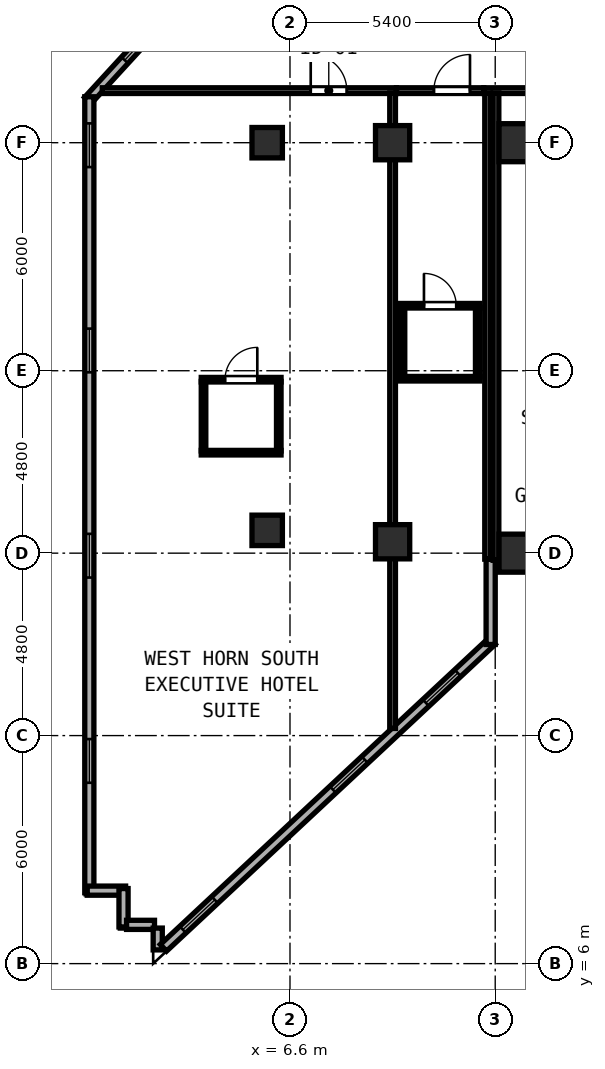
"""IFC4 building model, lengths in metres.
Left out: names, types, materials, properties, quantities, classifications, styles, units other than length and angle.
Written with IfcOpenShell. Run it as: python <this file> out.ifc"""

import sys

from ifc_helpers import new_model, si_unit, direction, frame, frame_2d, origin, origin_2d, place, context, subcontext, project, spatial, rectangle, hollow_rectangle, extrude, element, fill, save


model = new_model("IFC4")
c1 = context("Model", 3, precision=1e-05, world=origin(), true_north=direction((0.0, 1.0)))
c2 = subcontext(c1, "Body", "Model", "MODEL_VIEW")
j1 = project(units=[si_unit("LENGTHUNIT", "METRE"), si_unit("PLANEANGLEUNIT", "RADIAN")], contexts=[c1])
p1 = place(None, origin())
s1 = spatial("IfcSite", under=j1, at=p1, CompositionType="ELEMENT")
p2 = place(p1, origin())
s2 = spatial("IfcBuilding", under=s1, at=p2, CompositionType="ELEMENT")
p3 = place(p2, frame((0.0, 0.0, 152.4)))
s3 = spatial("IfcBuildingStorey", under=s2, at=p3, CompositionType="ELEMENT", Elevation=152.4)
for number, where, z_axis, x_axis in (
    (1, (12.6, 16.8, 0.0), (0.0, 0.0, 1.0), (1.0, 0.0, 0.0)),
    (2, (12.6, 27.6, 0.0), (0.0, 0.0, 1.0), (1.0, 0.0, 0.0)),
):
    element("IfcColumn", number, at=place(p3, frame(where, z_axis=z_axis, x_axis=x_axis)), inside=s3, PredefinedType="COLUMN", context=c2, shape_type="SweptSolid", body=[
        extrude(hollow_rectangle(XDim=1.0, YDim=1.0, WallThickness=0.038, at=origin_2d()), origin(), (0.0, 0.0, 1.0), 3.8),
    ])
for number, where, z_axis, x_axis in (
    (3, (6.0, 17.4, 0.0), (0.0, 0.0, 1.0), (1.0, 0.0, 0.0)),
    (4, (6.0, 27.6, 0.0), (0.0, 0.0, 1.0), (1.0, 0.0, 0.0)),
):
    element("IfcColumn", number, at=place(p3, frame(where, z_axis=z_axis, x_axis=x_axis)), inside=s3, PredefinedType="COLUMN", context=c2, shape_type="SweptSolid", body=[
        extrude(hollow_rectangle(XDim=0.8, YDim=0.8, WallThickness=0.03, at=origin_2d()), origin(), (0.0, 0.0, 1.0), 3.8),
    ])
for number, where, z_axis, x_axis in (
    (5, (9.3, 17.1, 0.0), (0.0, 0.0, 1.0), (1.0, 0.0, 0.0)),
    (6, (9.3, 27.6, 0.0), (0.0, 0.0, 1.0), (1.0, 0.0, 0.0)),
):
    element("IfcColumn", number, at=place(p3, frame(where, z_axis=z_axis, x_axis=x_axis)), inside=s3, PredefinedType="COLUMN", context=c2, shape_type="SweptSolid", body=[
        extrude(hollow_rectangle(XDim=0.9, YDim=0.9, WallThickness=0.034, at=origin_2d()), origin(), (0.0, 0.0, 1.0), 3.8),
    ])
p4 = place(p3, frame((3.502, 31.134, 0.0), z_axis=(0.0, 0.0, 1.0), x_axis=(-0.675781844312, -0.737101688302, 0.0)))
e7 = element("IfcWall", 7, at=p4, inside=s3, PredefinedType="SOLIDWALL", context=c2, shape_type="SweptSolid", body=[
    extrude(rectangle(XDim=3.285, YDim=0.24, at=frame_2d((1.642, 0.0))), origin(), (0.0, 0.0, 1.0), 3.6),
])
p5 = place(p4, frame((0.7, 0.0, 0.85)))
e8 = element("IfcOpeningElement", 8, at=p5, cuts=e7, PredefinedType="OPENING", context=c2, shape_type="SweptSolid", body=[
    extrude(rectangle(XDim=1.15, YDim=1.8, at=frame_2d((0.575, 0.9))), frame((0.0, 0.13, 0.0), z_axis=(0.0, -1.0, 0.0), x_axis=(1.0, 0.0, 0.0)), (0.0, 0.0, 1.0), 0.26),
])
p6 = place(p3, frame((1.32, 28.808, 0.0), z_axis=(0.0, 0.0, 1.0), x_axis=(0.0, -1.0, 0.0)))
e9 = element("IfcWall", 9, at=p6, inside=s3, PredefinedType="SOLIDWALL", context=c2, shape_type="SweptSolid", body=[
    extrude(rectangle(XDim=20.943, YDim=0.24, at=frame_2d((10.472, 0.0))), origin(), (0.0, 0.0, 1.0), 3.6),
])
p7 = place(p6, frame((0.7, 0.0, 0.85)))
e10 = element("IfcOpeningElement", 10, at=p7, cuts=e9, PredefinedType="OPENING", context=c2, shape_type="SweptSolid", body=[
    extrude(rectangle(XDim=1.15, YDim=1.8, at=frame_2d((0.575, 0.9))), frame((0.0, 0.13, 0.0), z_axis=(0.0, -1.0, 0.0), x_axis=(1.0, 0.0, 0.0)), (0.0, 0.0, 1.0), 0.26),
])
p8 = place(p6, frame((6.1, 0.0, 0.85)))
e11 = element("IfcOpeningElement", 11, at=p8, cuts=e9, PredefinedType="OPENING", context=c2, shape_type="SweptSolid", body=[
    extrude(rectangle(XDim=1.15, YDim=1.8, at=frame_2d((0.575, 0.9))), frame((0.0, 0.13, 0.0), z_axis=(0.0, -1.0, 0.0), x_axis=(1.0, 0.0, 0.0)), (0.0, 0.0, 1.0), 0.26),
])
p9 = place(p6, frame((11.5, 0.0, 0.85)))
e12 = element("IfcOpeningElement", 12, at=p9, cuts=e9, PredefinedType="OPENING", context=c2, shape_type="SweptSolid", body=[
    extrude(rectangle(XDim=1.15, YDim=1.8, at=frame_2d((0.575, 0.9))), frame((0.0, 0.13, 0.0), z_axis=(0.0, -1.0, 0.0), x_axis=(1.0, 0.0, 0.0)), (0.0, 0.0, 1.0), 0.26),
])
p10 = place(p6, frame((16.9, 0.0, 0.85)))
e13 = element("IfcOpeningElement", 13, at=p10, cuts=e9, PredefinedType="OPENING", context=c2, shape_type="SweptSolid", body=[
    extrude(rectangle(XDim=1.15, YDim=1.8, at=frame_2d((0.575, 0.9))), frame((0.0, 0.13, 0.0), z_axis=(0.0, -1.0, 0.0), x_axis=(1.0, 0.0, 0.0)), (0.0, 0.0, 1.0), 0.26),
])
for number, where, z_axis, x_axis in (
    (14, (1.265, 7.92, 0.0), (0.0, 0.0, 1.0), (1.0, 0.0, 0.0)),
    (15, (2.22, 7.975, 0.0), (0.0, 0.0, 1.0), (0.0, -1.0, 0.0)),
):
    element("IfcWall", number, at=place(p3, frame(where, z_axis=z_axis, x_axis=x_axis)), inside=s3, PredefinedType="SOLIDWALL", context=c2, shape_type="SweptSolid", body=[
        extrude(rectangle(XDim=1.01, YDim=0.24, at=frame_2d((0.505, 0.0))), origin(), (0.0, 0.0, 1.0), 3.6),
    ])
p11 = place(p3, frame((2.3, 7.02, 0.0), z_axis=(0.0, 0.0, 1.0), x_axis=(1.0, 0.0, 0.0)))
e16 = element("IfcWall", 16, at=p11, inside=s3, PredefinedType="SOLIDWALL", context=c2, shape_type="SweptSolid", body=[
    extrude(rectangle(XDim=0.735, YDim=0.24, at=frame_2d((0.367, 0.0))), origin(), (0.0, 0.0, 1.0), 3.6),
])
p12 = place(p3, frame((3.12, 6.935, 0.0), z_axis=(0.0, 0.0, 1.0), x_axis=(0.0, -1.0, 0.0)))
e17 = element("IfcWall", 17, at=p12, inside=s3, PredefinedType="SOLIDWALL", context=c2, shape_type="SweptSolid", body=[
    extrude(rectangle(XDim=0.574, YDim=0.24, at=frame_2d((0.287, 0.0))), origin(), (0.0, 0.0, 1.0), 3.6),
])
p13 = place(p3, frame((3.27, 6.416, 0.0), z_axis=(0.0, 0.0, 1.0), x_axis=(0.731064187858, 0.682308693505, 0.0)))
e18 = element("IfcWall", 18, at=p13, inside=s3, PredefinedType="SOLIDWALL", context=c2, shape_type="SweptSolid", body=[
    extrude(rectangle(XDim=11.833, YDim=0.24, at=frame_2d((5.916, 0.0))), origin(), (0.0, 0.0, 1.0), 3.6),
])
p14 = place(p13, frame((0.7, 0.0, 0.85)))
e19 = element("IfcOpeningElement", 19, at=p14, cuts=e18, PredefinedType="OPENING", context=c2, shape_type="SweptSolid", body=[
    extrude(rectangle(XDim=1.15, YDim=1.8, at=frame_2d((0.575, 0.9))), frame((0.0, 0.13, 0.0), z_axis=(0.0, -1.0, 0.0), x_axis=(1.0, 0.0, 0.0)), (0.0, 0.0, 1.0), 0.26),
])
p15 = place(p13, frame((6.1, 0.0, 0.85)))
e20 = element("IfcOpeningElement", 20, at=p15, cuts=e18, PredefinedType="OPENING", context=c2, shape_type="SweptSolid", body=[
    extrude(rectangle(XDim=1.15, YDim=1.8, at=frame_2d((0.575, 0.9))), frame((0.0, 0.13, 0.0), z_axis=(0.0, -1.0, 0.0), x_axis=(1.0, 0.0, 0.0)), (0.0, 0.0, 1.0), 0.26),
])
p16 = place(p13, frame((9.446, 0.0, 0.85)))
e21 = element("IfcOpeningElement", 21, at=p16, cuts=e18, PredefinedType="OPENING", context=c2, shape_type="SweptSolid", body=[
    extrude(rectangle(XDim=1.15, YDim=1.8, at=frame_2d((0.575, 0.9))), frame((0.0, 0.13, 0.0), z_axis=(0.0, -1.0, 0.0), x_axis=(1.0, 0.0, 0.0)), (0.0, 0.0, 1.0), 0.26),
])
p17 = place(p3, frame((11.88, 14.397, 0.0), z_axis=(0.0, 0.0, 1.0), x_axis=(0.0, 1.0, 0.0)))
e22 = element("IfcWall", 22, at=p17, inside=s3, PredefinedType="SOLIDWALL", context=c2, shape_type="SweptSolid", body=[
    extrude(rectangle(XDim=2.243, YDim=0.24, at=frame_2d((1.121, 0.0))), origin(), (0.0, 0.0, 1.0), 3.6),
])
p18 = place(p3, frame((11.7, 28.97, 0.0), z_axis=(0.0, 0.0, 1.0), x_axis=(1.0, 0.0, 0.0)))
e23 = element("IfcWall", 23, at=p18, inside=s3, PredefinedType="PARTITIONING", context=c2, shape_type="SweptSolid", body=[
    extrude(rectangle(XDim=4.59, YDim=0.15, at=frame_2d((2.295, 0.0))), origin(), (0.0, 0.0, 1.0), 3.6),
])
p19 = place(p18, frame((4.311, 0.0, 0.0), z_axis=(0.0, 0.0, 1.0), x_axis=(-1.0, 0.0, 0.0)))
e24 = element("IfcOpeningElement", 24, at=p19, cuts=e23, PredefinedType="OPENING", context=c2, shape_type="SweptSolid", body=[
    extrude(rectangle(XDim=0.95, YDim=2.15, at=frame_2d((0.475, 1.075))), frame((0.0, 0.085, 0.0), z_axis=(0.0, -1.0, 0.0), x_axis=(1.0, 0.0, 0.0)), (0.0, 0.0, 1.0), 0.17),
])
p20 = place(p3, frame((11.8, 16.642, 0.0), z_axis=(0.0, 0.0, 1.0), x_axis=(0.0, 1.0, 0.0)))
e25 = element("IfcWall", 25, at=p20, inside=s3, PredefinedType="PARTITIONING", context=c2, shape_type="SweptSolid", body=[
    extrude(rectangle(XDim=12.268, YDim=0.15, at=frame_2d((6.134, 0.0))), origin(), (0.0, 0.0, 1.0), 3.6),
])
p21 = place(p3, frame((1.661, 28.97, 0.0), z_axis=(0.0, 0.0, 1.0), x_axis=(1.0, 0.0, 0.0)))
e26 = element("IfcWall", 26, at=p21, inside=s3, PredefinedType="PARTITIONING", context=c2, shape_type="SweptSolid", body=[
    extrude(rectangle(XDim=7.739, YDim=0.15, at=frame_2d((3.87, 0.0))), origin(), (0.0, 0.0, 1.0), 3.6),
])
p22 = place(p21, frame((6.434, 0.0, 0.0), z_axis=(0.0, 0.0, 1.0), x_axis=(-1.0, 0.0, 0.0)))
e27 = element("IfcOpeningElement", 27, at=p22, cuts=e26, PredefinedType="OPENING", context=c2, shape_type="SweptSolid", body=[
    extrude(rectangle(XDim=0.95, YDim=2.18, at=frame_2d((0.475, 1.09))), frame((0.0, 0.085, 0.0), z_axis=(0.0, -1.0, 0.0), x_axis=(1.0, 0.0, 0.0)), (0.0, 0.0, 1.0), 0.17),
])
p23 = place(p3, frame((9.3, 12.188, 0.0), z_axis=(0.0, 0.0, 1.0), x_axis=(0.0, 1.0, 0.0)))
e28 = element("IfcWall", 28, at=p23, inside=s3, PredefinedType="PARTITIONING", context=c2, shape_type="SweptSolid", body=[
    extrude(rectangle(XDim=16.722, YDim=0.15, at=frame_2d((8.361, 0.0))), origin(), (0.0, 0.0, 1.0), 3.6),
])
p24 = place(p3, frame((4.265, 21.364, 0.0), z_axis=(0.0, 0.0, 1.0), x_axis=(1.0, 0.0, 0.0)))
e29 = element("IfcWall", 29, at=p24, inside=s3, PredefinedType="PARTITIONING", context=c2, shape_type="SweptSolid", body=[
    extrude(rectangle(XDim=2.1, YDim=0.12, at=frame_2d((1.05, 0.0))), origin(), (0.0, 0.0, 1.0), 3.6),
])
p25 = place(p24, frame((1.475, 0.0, 0.0), z_axis=(0.0, 0.0, 1.0), x_axis=(-1.0, 0.0, 0.0)))
e30 = element("IfcOpeningElement", 30, at=p25, cuts=e29, PredefinedType="OPENING", context=c2, shape_type="SweptSolid", body=[
    extrude(rectangle(XDim=0.85, YDim=2.1, at=frame_2d((0.425, 1.05))), frame((0.0, 0.07, 0.0), z_axis=(0.0, -1.0, 0.0), x_axis=(1.0, 0.0, 0.0)), (0.0, 0.0, 1.0), 0.14),
])
p26 = place(p3, frame((4.265, 19.444, 0.0), z_axis=(0.0, 0.0, 1.0), x_axis=(1.0, 0.0, 0.0)))
e31 = element("IfcWall", 31, at=p26, inside=s3, PredefinedType="PARTITIONING", context=c2, shape_type="SweptSolid", body=[
    extrude(rectangle(XDim=2.1, YDim=0.12, at=frame_2d((1.05, 0.0))), origin(), (0.0, 0.0, 1.0), 3.6),
])
for number, where, z_axis, x_axis in (
    (32, (4.325, 19.489, 0.0), (0.0, 0.0, 1.0), (0.0, 1.0, 0.0)),
    (33, (6.305, 19.489, 0.0), (0.0, 0.0, 1.0), (0.0, 1.0, 0.0)),
):
    element("IfcWall", number, at=place(p3, frame(where, z_axis=z_axis, x_axis=x_axis)), inside=s3, PredefinedType="PARTITIONING", context=c2, shape_type="SweptSolid", body=[
        extrude(rectangle(XDim=1.83, YDim=0.12, at=frame_2d((0.915, 0.0))), origin(), (0.0, 0.0, 1.0), 3.6),
    ])
p27 = place(p3, frame((9.402, 28.97, 0.0), z_axis=(0.0, 0.0, 1.0), x_axis=(1.0, 0.0, 0.0)))
e34 = element("IfcWall", 34, at=p27, inside=s3, PredefinedType="PARTITIONING", context=c2, shape_type="SweptSolid", body=[
    extrude(rectangle(XDim=2.296, YDim=0.15, at=frame_2d((1.148, 0.0))), origin(), (0.0, 0.0, 1.0), 3.6),
])
p28 = place(p27, frame((1.934, 0.0, 0.0), z_axis=(0.0, 0.0, 1.0), x_axis=(-1.0, 0.0, 0.0)))
e35 = element("IfcOpeningElement", 35, at=p28, cuts=e34, PredefinedType="OPENING", context=c2, shape_type="SweptSolid", body=[
    extrude(rectangle(XDim=0.95, YDim=2.15, at=frame_2d((0.475, 1.075))), frame((0.0, 0.085, 0.0), z_axis=(0.0, -1.0, 0.0), x_axis=(1.0, 0.0, 0.0)), (0.0, 0.0, 1.0), 0.17),
])
p29 = place(p3, frame((12.02, 16.612, 0.0), z_axis=(0.0, 0.0, 1.0), x_axis=(0.0, 1.0, 0.0)))
e36 = element("IfcWall", 36, at=p29, inside=s3, PredefinedType="PARTITIONING", context=c2, shape_type="SweptSolid", body=[
    extrude(rectangle(XDim=12.298, YDim=0.15, at=frame_2d((6.149, 0.0))), origin(), (0.0, 0.0, 1.0), 3.6),
])
p30 = place(p3, frame((9.5, 23.31, 0.0), z_axis=(0.0, 0.0, 1.0), x_axis=(1.0, 0.0, 0.0)))
e37 = element("IfcWall", 37, at=p30, inside=s3, PredefinedType="PARTITIONING", context=c2, shape_type="SweptSolid", body=[
    extrude(rectangle(XDim=2.1, YDim=0.12, at=frame_2d((1.05, 0.0))), origin(), (0.0, 0.0, 1.0), 3.6),
])
p31 = place(p30, frame((1.475, 0.0, 0.0), z_axis=(0.0, 0.0, 1.0), x_axis=(-1.0, 0.0, 0.0)))
e38 = element("IfcOpeningElement", 38, at=p31, cuts=e37, PredefinedType="OPENING", context=c2, shape_type="SweptSolid", body=[
    extrude(rectangle(XDim=0.85, YDim=2.1, at=frame_2d((0.425, 1.05))), frame((0.0, 0.07, 0.0), z_axis=(0.0, -1.0, 0.0), x_axis=(1.0, 0.0, 0.0)), (0.0, 0.0, 1.0), 0.14),
])
p32 = place(p3, frame((9.5, 21.39, 0.0), z_axis=(0.0, 0.0, 1.0), x_axis=(1.0, 0.0, 0.0)))
e39 = element("IfcWall", 39, at=p32, inside=s3, PredefinedType="PARTITIONING", context=c2, shape_type="SweptSolid", body=[
    extrude(rectangle(XDim=2.1, YDim=0.12, at=frame_2d((1.05, 0.0))), origin(), (0.0, 0.0, 1.0), 3.6),
])
for number, where, z_axis, x_axis in (
    (40, (9.56, 21.435, 0.0), (0.0, 0.0, 1.0), (0.0, 1.0, 0.0)),
    (41, (11.54, 21.435, 0.0), (0.0, 0.0, 1.0), (0.0, 1.0, 0.0)),
):
    element("IfcWall", number, at=place(p3, frame(where, z_axis=z_axis, x_axis=x_axis)), inside=s3, PredefinedType="PARTITIONING", context=c2, shape_type="SweptSolid", body=[
        extrude(rectangle(XDim=1.83, YDim=0.12, at=frame_2d((0.915, 0.0))), origin(), (0.0, 0.0, 1.0), 3.6),
    ])
p33 = place(p5, origin())
e42 = element("IfcWindow", 42, at=p33, inside=s3, PartitioningType="SINGLE_PANEL", PredefinedType="WINDOW", context=c2, shape_type="SweptSolid", body=[
    extrude(rectangle(XDim=1.15, YDim=1.8, at=frame_2d((0.575, 0.9))), frame((0.0, 0.03, 0.0), z_axis=(0.0, -1.0, 0.0), x_axis=(1.0, 0.0, 0.0)), (0.0, 0.0, 1.0), 0.06),
])
fill(e8, e42)
p34 = place(p7, origin())
e43 = element("IfcWindow", 43, at=p34, inside=s3, PartitioningType="SINGLE_PANEL", PredefinedType="WINDOW", context=c2, shape_type="SweptSolid", body=[
    extrude(rectangle(XDim=1.15, YDim=1.8, at=frame_2d((0.575, 0.9))), frame((0.0, 0.03, 0.0), z_axis=(0.0, -1.0, 0.0), x_axis=(1.0, 0.0, 0.0)), (0.0, 0.0, 1.0), 0.06),
])
fill(e10, e43)
p35 = place(p8, origin())
e44 = element("IfcWindow", 44, at=p35, inside=s3, PartitioningType="SINGLE_PANEL", PredefinedType="WINDOW", context=c2, shape_type="SweptSolid", body=[
    extrude(rectangle(XDim=1.15, YDim=1.8, at=frame_2d((0.575, 0.9))), frame((0.0, 0.03, 0.0), z_axis=(0.0, -1.0, 0.0), x_axis=(1.0, 0.0, 0.0)), (0.0, 0.0, 1.0), 0.06),
])
fill(e11, e44)
p36 = place(p9, origin())
e45 = element("IfcWindow", 45, at=p36, inside=s3, PartitioningType="SINGLE_PANEL", PredefinedType="WINDOW", context=c2, shape_type="SweptSolid", body=[
    extrude(rectangle(XDim=1.15, YDim=1.8, at=frame_2d((0.575, 0.9))), frame((0.0, 0.03, 0.0), z_axis=(0.0, -1.0, 0.0), x_axis=(1.0, 0.0, 0.0)), (0.0, 0.0, 1.0), 0.06),
])
fill(e12, e45)
p37 = place(p10, origin())
e46 = element("IfcWindow", 46, at=p37, inside=s3, PartitioningType="SINGLE_PANEL", PredefinedType="WINDOW", context=c2, shape_type="SweptSolid", body=[
    extrude(rectangle(XDim=1.15, YDim=1.8, at=frame_2d((0.575, 0.9))), frame((0.0, 0.03, 0.0), z_axis=(0.0, -1.0, 0.0), x_axis=(1.0, 0.0, 0.0)), (0.0, 0.0, 1.0), 0.06),
])
fill(e13, e46)
p38 = place(p14, origin())
e47 = element("IfcWindow", 47, at=p38, inside=s3, PartitioningType="SINGLE_PANEL", PredefinedType="WINDOW", context=c2, shape_type="SweptSolid", body=[
    extrude(rectangle(XDim=1.15, YDim=1.8, at=frame_2d((0.575, 0.9))), frame((0.0, 0.03, 0.0), z_axis=(0.0, -1.0, 0.0), x_axis=(1.0, 0.0, 0.0)), (0.0, 0.0, 1.0), 0.06),
])
fill(e19, e47)
p39 = place(p15, origin())
e48 = element("IfcWindow", 48, at=p39, inside=s3, PartitioningType="SINGLE_PANEL", PredefinedType="WINDOW", context=c2, shape_type="SweptSolid", body=[
    extrude(rectangle(XDim=1.15, YDim=1.8, at=frame_2d((0.575, 0.9))), frame((0.0, 0.03, 0.0), z_axis=(0.0, -1.0, 0.0), x_axis=(1.0, 0.0, 0.0)), (0.0, 0.0, 1.0), 0.06),
])
fill(e20, e48)
p40 = place(p22, origin())
e49 = element("IfcDoor", 49, at=p40, inside=s3, OperationType="SINGLE_SWING_RIGHT", PredefinedType="DOOR", context=c2, shape_type="SweptSolid", body=[
    extrude(rectangle(XDim=0.95, YDim=2.18, at=frame_2d((0.475, 1.09))), frame((0.0, 0.025, 0.0), z_axis=(0.0, -1.0, 0.0), x_axis=(1.0, 0.0, 0.0)), (0.0, 0.0, 1.0), 0.05),
])
fill(e27, e49)
p41 = place(p25, origin())
e50 = element("IfcDoor", 50, at=p41, inside=s3, OperationType="SINGLE_SWING_LEFT", PredefinedType="DOOR", context=c2, shape_type="SweptSolid", body=[
    extrude(rectangle(XDim=0.85, YDim=2.1, at=frame_2d((0.425, 1.05))), frame((0.0, 0.025, 0.0), z_axis=(0.0, -1.0, 0.0), x_axis=(1.0, 0.0, 0.0)), (0.0, 0.0, 1.0), 0.05),
])
fill(e30, e50)
p42 = place(p28, origin())
e51 = element("IfcDoor", 51, at=p42, inside=s3, OperationType="SINGLE_SWING_LEFT", PredefinedType="DOOR", context=c2, shape_type="SweptSolid", body=[
    extrude(rectangle(XDim=0.95, YDim=2.15, at=frame_2d((0.475, 1.075))), frame((0.0, 0.025, 0.0), z_axis=(0.0, -1.0, 0.0), x_axis=(1.0, 0.0, 0.0)), (0.0, 0.0, 1.0), 0.05),
])
fill(e35, e51)
p43 = place(p31, origin())
e52 = element("IfcDoor", 52, at=p43, inside=s3, OperationType="SINGLE_SWING_RIGHT", PredefinedType="DOOR", context=c2, shape_type="SweptSolid", body=[
    extrude(rectangle(XDim=0.85, YDim=2.1, at=frame_2d((0.425, 1.05))), frame((0.0, 0.025, 0.0), z_axis=(0.0, -1.0, 0.0), x_axis=(1.0, 0.0, 0.0)), (0.0, 0.0, 1.0), 0.05),
])
fill(e38, e52)
p44 = place(p16, origin())
e53 = element("IfcWindow", 53, at=p44, inside=s3, PartitioningType="SINGLE_PANEL", PredefinedType="WINDOW", context=c2, shape_type="SweptSolid", body=[
    extrude(rectangle(XDim=1.15, YDim=1.8, at=frame_2d((0.575, 0.9))), frame((0.0, 0.03, 0.0), z_axis=(0.0, -1.0, 0.0), x_axis=(1.0, 0.0, 0.0)), (0.0, 0.0, 1.0), 0.06),
])
fill(e21, e53)
save(model, sys.argv[1])
